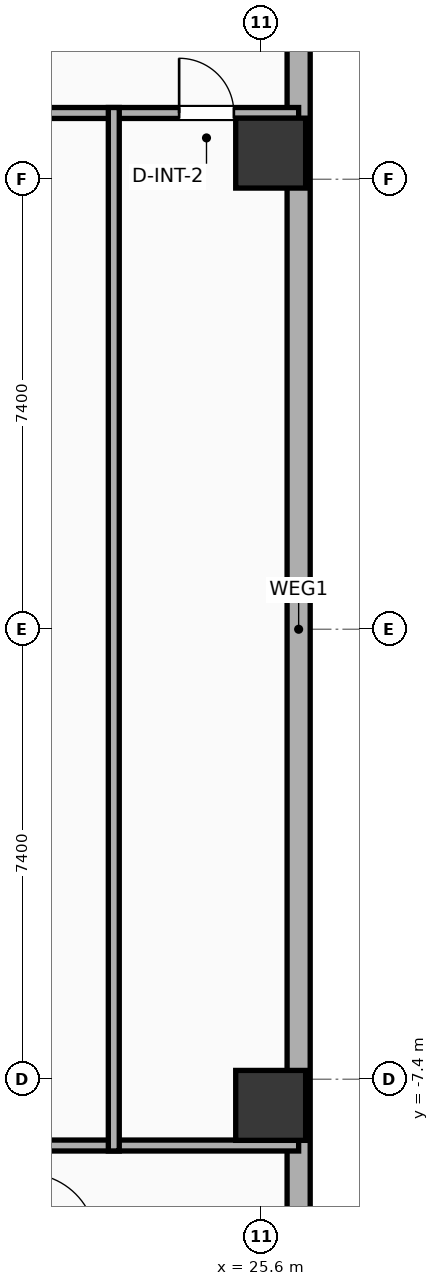
"""IFC4 building model, lengths in metres.
Left out: names, types, materials, properties, quantities, classifications, styles, units other than length and angle.
Written with IfcOpenShell. Run it as: python <this file> out.ifc"""

import sys

from ifc_helpers import new_model, si_unit, direction, frame, frame_2d, origin, origin_2d, place, context, subcontext, project, spatial, rectangle, hollow_rectangle, extrude, element, fill, save


model = new_model("IFC4")
c1 = context("Model", 3, precision=1e-05, world=origin(), true_north=direction((0.0, 1.0)))
c2 = subcontext(c1, "Body", "Model", "MODEL_VIEW")
j1 = project(units=[si_unit("LENGTHUNIT", "METRE"), si_unit("PLANEANGLEUNIT", "RADIAN")], contexts=[c1])
p1 = place(None, origin())
s1 = spatial("IfcSite", under=j1, at=p1, CompositionType="ELEMENT")
p2 = place(p1, origin())
s2 = spatial("IfcBuilding", under=s1, at=p2, CompositionType="ELEMENT")
p3 = place(p2, frame((0.0, 0.0, 33.8)))
s3 = spatial("IfcBuildingStorey", under=s2, at=p3, CompositionType="ELEMENT", Elevation=33.8)
for number, where, z_axis, x_axis in (
    (1, (25.75, -7.83, 0.0), (0.0, 0.0, 1.0), (1.0, 0.0, 0.0)),
    (2, (25.75, 7.83, 0.0), (0.0, 0.0, 1.0), (1.0, 0.0, 0.0)),
):
    element("IfcColumn", number, at=place(p3, frame(where, z_axis=z_axis, x_axis=x_axis)), inside=s3, PredefinedType="COLUMN", context=c2, shape_type="SweptSolid", body=[
        extrude(hollow_rectangle(XDim=1.15, YDim=1.15, WallThickness=0.04, at=origin_2d()), origin(), (0.0, 0.0, 1.0), 3.9),
    ])
p4 = place(p3, frame((26.21, 18.381, 0.0), z_axis=(0.0, 0.0, 1.0), x_axis=(0.0, -1.0, 0.0)))
e3 = element("IfcWall", 3, at=p4, inside=s3, PredefinedType="ELEMENTEDWALL", context=c2, shape_type="SweptSolid", body=[
    extrude(rectangle(XDim=36.763, YDim=0.38, at=frame_2d((18.381, 0.0))), origin(), (0.0, 0.0, 1.0), 3.65),
])
p5 = place(p4, frame((33.187, 0.0, 0.75)))
e4 = element("IfcOpeningElement", 4, at=p5, cuts=e3, PredefinedType="OPENING", context=c2, shape_type="SweptSolid", body=[
    extrude(rectangle(XDim=1.2, YDim=2.05, at=frame_2d((0.6, 1.025))), frame((0.0, 0.2, 0.0), z_axis=(0.0, -1.0, 0.0), x_axis=(1.0, 0.0, 0.0)), (0.0, 0.0, 1.0), 0.4),
])
p6 = place(p3, frame((9.88, 8.49, 0.0), z_axis=(0.0, 0.0, 1.0), x_axis=(1.0, 0.0, 0.0)))
e5 = element("IfcWall", 5, at=p6, inside=s3, PredefinedType="PARTITIONING", context=c2, shape_type="SweptSolid", body=[
    extrude(rectangle(XDim=16.33, YDim=0.18, at=frame_2d((8.165, 0.0))), origin(), (0.0, 0.0, 1.0), 3.65),
])
p7 = place(p6, frame((14.365, 0.0, 0.0)))
e6 = element("IfcOpeningElement", 6, at=p7, cuts=e5, PredefinedType="OPENING", context=c2, shape_type="SweptSolid", body=[
    extrude(rectangle(XDim=0.9, YDim=2.05, at=frame_2d((0.45, 1.025))), frame((0.0, 0.1, 0.0), z_axis=(0.0, -1.0, 0.0), x_axis=(1.0, 0.0, 0.0)), (0.0, 0.0, 1.0), 0.2),
])
p8 = place(p3, frame((9.88, -8.49, 0.0), z_axis=(0.0, 0.0, 1.0), x_axis=(1.0, 0.0, 0.0)))
e7 = element("IfcWall", 7, at=p8, inside=s3, PredefinedType="PARTITIONING", context=c2, shape_type="SweptSolid", body=[
    extrude(rectangle(XDim=16.33, YDim=0.18, at=frame_2d((8.165, 0.0))), origin(), (0.0, 0.0, 1.0), 3.65),
])
p9 = place(p3, frame((23.17, -8.58, 0.0), z_axis=(0.0, 0.0, 1.0), x_axis=(0.0, 1.0, 0.0)))
e8 = element("IfcWall", 8, at=p9, inside=s3, PredefinedType="PARTITIONING", context=c2, shape_type="SweptSolid", body=[
    extrude(rectangle(XDim=17.16, YDim=0.18, at=frame_2d((8.58, 0.0))), origin(), (0.0, 0.0, 1.0), 3.65),
])
p10 = place(p7, origin())
e9 = element("IfcDoor", 9, at=p10, inside=s3, OperationType="SINGLE_SWING_LEFT", PredefinedType="DOOR", context=c2, shape_type="SweptSolid", body=[
    extrude(rectangle(XDim=0.9, YDim=2.05, at=frame_2d((0.45, 1.025))), frame((0.0, 0.025, 0.0), z_axis=(0.0, -1.0, 0.0), x_axis=(1.0, 0.0, 0.0)), (0.0, 0.0, 1.0), 0.05),
])
fill(e6, e9)
save(model, sys.argv[1])
